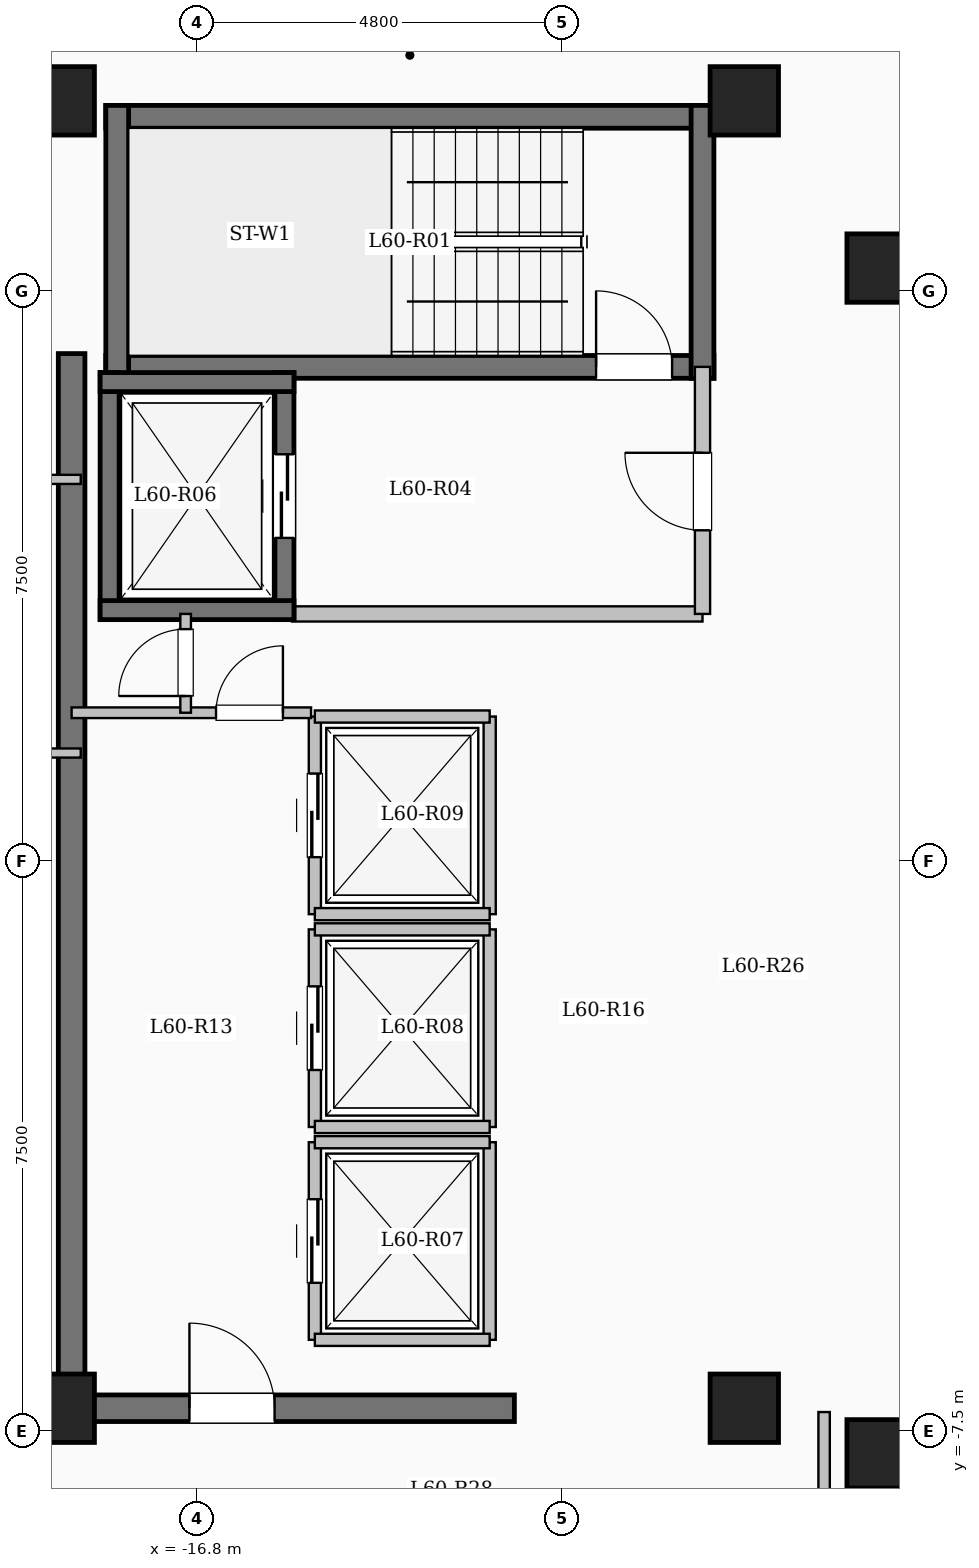
"""IFC4 building model, lengths in metres.
Left out: names, types, materials, properties, quantities, classifications, styles, units other than length and angle.
Written with IfcOpenShell. Run it as: python <this file> out.ifc"""

import sys

from ifc_helpers import new_model, si_unit, direction, frame, frame_2d, origin, origin_2d, place, context, subcontext, project, spatial, rectangle, extrude, element, fill, save


model = new_model("IFC4")
c1 = context("Model", 3, precision=1e-05, world=origin(), true_north=direction((0.0, 1.0)))
c2 = subcontext(c1, "Body", "Model", "MODEL_VIEW")
j1 = project(units=[si_unit("LENGTHUNIT", "METRE"), si_unit("PLANEANGLEUNIT", "RADIAN")], contexts=[c1])
p1 = place(None, origin())
s1 = spatial("IfcSite", under=j1, at=p1, CompositionType="ELEMENT")
p2 = place(p1, origin())
s2 = spatial("IfcBuilding", under=s1, at=p2, CompositionType="ELEMENT")
p3 = place(p2, frame((0.0, 0.0, 220.4)))
s3 = spatial("IfcBuildingStorey", under=s2, at=p3, CompositionType="ELEMENT", Elevation=220.4)
for number, where, z_axis, x_axis in (
    (1, (-7.8, -7.8, 0.0), (0.0, 0.0, 1.0), (1.0, 0.0, 0.0)),
    (2, (-7.8, 7.8, 0.0), (0.0, 0.0, 1.0), (1.0, 0.0, 0.0)),
    (3, (-9.6, -7.2, 0.0), (0.0, 0.0, 1.0), (1.0, 0.0, 0.0)),
    (4, (-9.6, 10.0, 0.0), (0.0, 0.0, 1.0), (1.0, 0.0, 0.0)),
    (5, (-18.6, -7.2, 0.0), (0.0, 0.0, 1.0), (1.0, 0.0, 0.0)),
    (6, (-18.6, 10.0, 0.0), (0.0, 0.0, 1.0), (1.0, 0.0, 0.0)),
):
    element("IfcColumn", number, at=place(p3, frame(where, z_axis=z_axis, x_axis=x_axis)), inside=s3, PredefinedType="COLUMN", context=c2, shape_type="SweptSolid", body=[
        extrude(rectangle(XDim=0.9, YDim=0.9, at=origin_2d()), origin(), (0.0, 0.0, 1.0), 3.35),
    ])
p4 = place(p3, frame((-18.0, 9.79, 0.0), z_axis=(0.0, 0.0, 1.0), x_axis=(1.0, 0.0, 0.0)))
e7 = element("IfcWall", 7, at=p4, inside=s3, PredefinedType="SHEAR", context=c2, shape_type="SweptSolid", body=[
    extrude(rectangle(XDim=8.0, YDim=0.3, at=frame_2d((4.0, 0.0))), origin(), (0.0, 0.0, 1.0), 3.35),
])
p5 = place(p3, frame((-18.0, 6.5, 0.0), z_axis=(0.0, 0.0, 1.0), x_axis=(1.0, 0.0, 0.0)))
e8 = element("IfcWall", 8, at=p5, inside=s3, PredefinedType="SHEAR", context=c2, shape_type="SweptSolid", body=[
    extrude(rectangle(XDim=8.0, YDim=0.3, at=frame_2d((4.0, 0.0))), origin(), (0.0, 0.0, 1.0), 3.35),
])
p6 = place(p5, frame((6.45, 0.0, 0.0)))
e9 = element("IfcOpeningElement", 9, at=p6, cuts=e8, PredefinedType="OPENING", context=c2, shape_type="SweptSolid", body=[
    extrude(rectangle(XDim=1.0, YDim=2.15, at=frame_2d((0.5, 1.075))), frame((0.0, 0.16, 0.0), z_axis=(0.0, -1.0, 0.0), x_axis=(1.0, 0.0, 0.0)), (0.0, 0.0, 1.0), 0.32),
])
for number, where, z_axis, x_axis in (
    (10, (-17.85, 6.35, 0.0), (0.0, 0.0, 1.0), (0.0, 1.0, 0.0)),
    (11, (-10.15, 6.35, 0.0), (0.0, 0.0, 1.0), (0.0, 1.0, 0.0)),
):
    element("IfcWall", number, at=place(p3, frame(where, z_axis=z_axis, x_axis=x_axis)), inside=s3, PredefinedType="SHEAR", context=c2, shape_type="SweptSolid", body=[
        extrude(rectangle(XDim=3.59, YDim=0.3, at=frame_2d((1.795, 0.0))), origin(), (0.0, 0.0, 1.0), 3.35),
    ])
p7 = place(p3, frame((-15.55, 3.25, 0.0), z_axis=(0.0, 0.0, 1.0), x_axis=(1.0, 0.0, 0.0)))
e12 = element("IfcWall", 12, at=p7, inside=s3, PredefinedType="SOLIDWALL", context=c2, shape_type="SweptSolid", body=[
    extrude(rectangle(XDim=5.4, YDim=0.2, at=frame_2d((2.7, 0.0))), origin(), (0.0, 0.0, 1.0), 3.1),
])
p8 = place(p3, frame((-10.15, 3.25, 0.0), z_axis=(0.0, 0.0, 1.0), x_axis=(0.0, 1.0, 0.0)))
e13 = element("IfcWall", 13, at=p8, inside=s3, PredefinedType="SOLIDWALL", context=c2, shape_type="SweptSolid", body=[
    extrude(rectangle(XDim=3.25, YDim=0.2, at=frame_2d((1.625, 0.0))), origin(), (0.0, 0.0, 1.0), 3.1),
])
p9 = place(p8, frame((1.1, 0.0, 0.0)))
e14 = element("IfcOpeningElement", 14, at=p9, cuts=e13, PredefinedType="OPENING", context=c2, shape_type="SweptSolid", body=[
    extrude(rectangle(XDim=1.02, YDim=2.15, at=frame_2d((0.51, 1.075))), frame((0.0, 0.11, 0.0), z_axis=(0.0, -1.0, 0.0), x_axis=(1.0, 0.0, 0.0)), (0.0, 0.0, 1.0), 0.22),
])
p10 = place(p3, frame((-17.95, 3.175, 0.0), z_axis=(0.0, 0.0, 1.0), x_axis=(0.0, 1.0, 0.0)))
e15 = element("IfcWall", 15, at=p10, inside=s3, PredefinedType="SHEAR", context=c2, shape_type="SweptSolid", body=[
    extrude(rectangle(XDim=3.25, YDim=0.25, at=frame_2d((1.625, 0.0))), origin(), (0.0, 0.0, 1.0), 3.35),
])
p11 = place(p3, frame((-15.65, 3.175, 0.0), z_axis=(0.0, 0.0, 1.0), x_axis=(0.0, 1.0, 0.0)))
e16 = element("IfcWall", 16, at=p11, inside=s3, PredefinedType="SHEAR", context=c2, shape_type="SweptSolid", body=[
    extrude(rectangle(XDim=3.25, YDim=0.25, at=frame_2d((1.625, 0.0))), origin(), (0.0, 0.0, 1.0), 3.35),
])
p12 = place(p11, frame((1.075, 0.0, 0.0)))
e17 = element("IfcOpeningElement", 17, at=p12, cuts=e16, PredefinedType="OPENING", context=c2, shape_type="SweptSolid", body=[
    extrude(rectangle(XDim=1.1, YDim=2.15, at=frame_2d((0.55, 1.075))), frame((0.0, 0.135, 0.0), z_axis=(0.0, -1.0, 0.0), x_axis=(1.0, 0.0, 0.0)), (0.0, 0.0, 1.0), 0.27),
])
for number, where, z_axis, x_axis in (
    (18, (-18.075, 3.3, 0.0), (0.0, 0.0, 1.0), (1.0, 0.0, 0.0)),
    (19, (-18.075, 6.3, 0.0), (0.0, 0.0, 1.0), (1.0, 0.0, 0.0)),
):
    element("IfcWall", number, at=place(p3, frame(where, z_axis=z_axis, x_axis=x_axis)), inside=s3, PredefinedType="SHEAR", context=c2, shape_type="SweptSolid", body=[
        extrude(rectangle(XDim=2.55, YDim=0.25, at=frame_2d((1.275, 0.0))), origin(), (0.0, 0.0, 1.0), 3.35),
    ])
p13 = place(p3, frame((-15.25, -6.3, 0.0), z_axis=(0.0, 0.0, 1.0), x_axis=(0.0, 1.0, 0.0)))
e20 = element("IfcWall", 20, at=p13, inside=s3, PredefinedType="SOLIDWALL", context=c2, shape_type="SweptSolid", body=[
    extrude(rectangle(XDim=2.6, YDim=0.16, at=frame_2d((1.3, 0.0))), origin(), (0.0, 0.0, 1.0), 3.1),
])
p14 = place(p13, frame((0.75, 0.0, 0.0)))
e21 = element("IfcOpeningElement", 21, at=p14, cuts=e20, PredefinedType="OPENING", context=c2, shape_type="SweptSolid", body=[
    extrude(rectangle(XDim=1.1, YDim=2.15, at=frame_2d((0.55, 1.075))), frame((0.0, 0.09, 0.0), z_axis=(0.0, -1.0, 0.0), x_axis=(1.0, 0.0, 0.0)), (0.0, 0.0, 1.0), 0.18),
])
p15 = place(p3, frame((-12.95, -6.3, 0.0), z_axis=(0.0, 0.0, 1.0), x_axis=(0.0, 1.0, 0.0)))
e22 = element("IfcWall", 22, at=p15, inside=s3, PredefinedType="SOLIDWALL", context=c2, shape_type="SweptSolid", body=[
    extrude(rectangle(XDim=2.6, YDim=0.16, at=frame_2d((1.3, 0.0))), origin(), (0.0, 0.0, 1.0), 3.1),
])
for number, where, z_axis, x_axis in (
    (23, (-15.25, -6.3, 0.0), (0.0, 0.0, 1.0), (1.0, 0.0, 0.0)),
    (24, (-15.25, -3.7, 0.0), (0.0, 0.0, 1.0), (1.0, 0.0, 0.0)),
):
    element("IfcWall", number, at=place(p3, frame(where, z_axis=z_axis, x_axis=x_axis)), inside=s3, PredefinedType="SOLIDWALL", context=c2, shape_type="SweptSolid", body=[
        extrude(rectangle(XDim=2.3, YDim=0.16, at=frame_2d((1.15, 0.0))), origin(), (0.0, 0.0, 1.0), 3.1),
    ])
p16 = place(p3, frame((-15.25, -3.5, 0.0), z_axis=(0.0, 0.0, 1.0), x_axis=(0.0, 1.0, 0.0)))
e25 = element("IfcWall", 25, at=p16, inside=s3, PredefinedType="SOLIDWALL", context=c2, shape_type="SweptSolid", body=[
    extrude(rectangle(XDim=2.6, YDim=0.16, at=frame_2d((1.3, 0.0))), origin(), (0.0, 0.0, 1.0), 3.1),
])
p17 = place(p16, frame((0.75, 0.0, 0.0)))
e26 = element("IfcOpeningElement", 26, at=p17, cuts=e25, PredefinedType="OPENING", context=c2, shape_type="SweptSolid", body=[
    extrude(rectangle(XDim=1.1, YDim=2.15, at=frame_2d((0.55, 1.075))), frame((0.0, 0.09, 0.0), z_axis=(0.0, -1.0, 0.0), x_axis=(1.0, 0.0, 0.0)), (0.0, 0.0, 1.0), 0.18),
])
p18 = place(p3, frame((-12.95, -3.5, 0.0), z_axis=(0.0, 0.0, 1.0), x_axis=(0.0, 1.0, 0.0)))
e27 = element("IfcWall", 27, at=p18, inside=s3, PredefinedType="SOLIDWALL", context=c2, shape_type="SweptSolid", body=[
    extrude(rectangle(XDim=2.6, YDim=0.16, at=frame_2d((1.3, 0.0))), origin(), (0.0, 0.0, 1.0), 3.1),
])
for number, where, z_axis, x_axis in (
    (28, (-15.25, -3.5, 0.0), (0.0, 0.0, 1.0), (1.0, 0.0, 0.0)),
    (29, (-15.25, -0.9, 0.0), (0.0, 0.0, 1.0), (1.0, 0.0, 0.0)),
):
    element("IfcWall", number, at=place(p3, frame(where, z_axis=z_axis, x_axis=x_axis)), inside=s3, PredefinedType="SOLIDWALL", context=c2, shape_type="SweptSolid", body=[
        extrude(rectangle(XDim=2.3, YDim=0.16, at=frame_2d((1.15, 0.0))), origin(), (0.0, 0.0, 1.0), 3.1),
    ])
p19 = place(p3, frame((-15.25, -0.7, 0.0), z_axis=(0.0, 0.0, 1.0), x_axis=(0.0, 1.0, 0.0)))
e30 = element("IfcWall", 30, at=p19, inside=s3, PredefinedType="SOLIDWALL", context=c2, shape_type="SweptSolid", body=[
    extrude(rectangle(XDim=2.6, YDim=0.16, at=frame_2d((1.3, 0.0))), origin(), (0.0, 0.0, 1.0), 3.1),
])
p20 = place(p19, frame((0.75, 0.0, 0.0)))
e31 = element("IfcOpeningElement", 31, at=p20, cuts=e30, PredefinedType="OPENING", context=c2, shape_type="SweptSolid", body=[
    extrude(rectangle(XDim=1.1, YDim=2.15, at=frame_2d((0.55, 1.075))), frame((0.0, 0.09, 0.0), z_axis=(0.0, -1.0, 0.0), x_axis=(1.0, 0.0, 0.0)), (0.0, 0.0, 1.0), 0.18),
])
p21 = place(p3, frame((-12.95, -0.7, 0.0), z_axis=(0.0, 0.0, 1.0), x_axis=(0.0, 1.0, 0.0)))
e32 = element("IfcWall", 32, at=p21, inside=s3, PredefinedType="SOLIDWALL", context=c2, shape_type="SweptSolid", body=[
    extrude(rectangle(XDim=2.6, YDim=0.16, at=frame_2d((1.3, 0.0))), origin(), (0.0, 0.0, 1.0), 3.1),
])
for number, where, z_axis, x_axis in (
    (33, (-15.25, -0.7, 0.0), (0.0, 0.0, 1.0), (1.0, 0.0, 0.0)),
    (34, (-15.25, 1.9, 0.0), (0.0, 0.0, 1.0), (1.0, 0.0, 0.0)),
):
    element("IfcWall", number, at=place(p3, frame(where, z_axis=z_axis, x_axis=x_axis)), inside=s3, PredefinedType="SOLIDWALL", context=c2, shape_type="SweptSolid", body=[
        extrude(rectangle(XDim=2.3, YDim=0.16, at=frame_2d((1.15, 0.0))), origin(), (0.0, 0.0, 1.0), 3.1),
    ])
p22 = place(p3, frame((-18.45, -7.375, 0.0), z_axis=(0.0, 0.0, 1.0), x_axis=(0.0, 1.0, 0.0)))
e35 = element("IfcWall", 35, at=p22, inside=s3, PredefinedType="SHEAR", context=c2, shape_type="SweptSolid", body=[
    extrude(rectangle(XDim=14.05, YDim=0.35, at=frame_2d((7.025, 0.0))), origin(), (0.0, 0.0, 1.0), 3.35),
])
p23 = place(p3, frame((-18.625, -7.2, 0.0), z_axis=(0.0, 0.0, 1.0), x_axis=(1.0, 0.0, 0.0)))
e36 = element("IfcWall", 36, at=p23, inside=s3, PredefinedType="SHEAR", context=c2, shape_type="SweptSolid", body=[
    extrude(rectangle(XDim=6.0, YDim=0.35, at=frame_2d((3.0, 0.0))), origin(), (0.0, 0.0, 1.0), 3.35),
])
p24 = place(p23, frame((1.725, 0.0, 0.0)))
e37 = element("IfcOpeningElement", 37, at=p24, cuts=e36, PredefinedType="OPENING", context=c2, shape_type="SweptSolid", body=[
    extrude(rectangle(XDim=1.12, YDim=2.15, at=frame_2d((0.56, 1.075))), frame((0.0, 0.185, 0.0), z_axis=(0.0, -1.0, 0.0), x_axis=(1.0, 0.0, 0.0)), (0.0, 0.0, 1.0), 0.37),
])
p25 = place(p3, frame((-18.45, 1.95, 0.0), z_axis=(0.0, 0.0, 1.0), x_axis=(1.0, 0.0, 0.0)))
e38 = element("IfcWall", 38, at=p25, inside=s3, PredefinedType="PARTITIONING", context=c2, shape_type="SweptSolid", body=[
    extrude(rectangle(XDim=3.15, YDim=0.14, at=frame_2d((1.575, 0.0))), origin(), (0.0, 0.0, 1.0), 3.1),
])
p26 = place(p25, frame((1.9, 0.0, 0.0)))
e39 = element("IfcOpeningElement", 39, at=p26, cuts=e38, PredefinedType="OPENING", context=c2, shape_type="SweptSolid", body=[
    extrude(rectangle(XDim=0.88, YDim=2.1, at=frame_2d((0.44, 1.05))), frame((0.0, 0.08, 0.0), z_axis=(0.0, -1.0, 0.0), x_axis=(1.0, 0.0, 0.0)), (0.0, 0.0, 1.0), 0.16),
])
p27 = place(p3, frame((-16.95, 1.95, 0.0), z_axis=(0.0, 0.0, 1.0), x_axis=(0.0, 1.0, 0.0)))
e40 = element("IfcWall", 40, at=p27, inside=s3, PredefinedType="PARTITIONING", context=c2, shape_type="SweptSolid", body=[
    extrude(rectangle(XDim=1.3, YDim=0.14, at=frame_2d((0.65, 0.0))), origin(), (0.0, 0.0, 1.0), 3.1),
])
p28 = place(p27, frame((0.22, 0.0, 0.0)))
e41 = element("IfcOpeningElement", 41, at=p28, cuts=e40, PredefinedType="OPENING", context=c2, shape_type="SweptSolid", body=[
    extrude(rectangle(XDim=0.88, YDim=2.1, at=frame_2d((0.44, 1.05))), frame((0.0, 0.08, 0.0), z_axis=(0.0, -1.0, 0.0), x_axis=(1.0, 0.0, 0.0)), (0.0, 0.0, 1.0), 0.16),
])
p29 = place(p3, frame((-8.55, -9.4, 0.0), z_axis=(0.0, 0.0, 1.0), x_axis=(0.0, 1.0, 0.0)))
e42 = element("IfcWall", 42, at=p29, inside=s3, PredefinedType="PARTITIONING", context=c2, shape_type="SweptSolid", body=[
    extrude(rectangle(XDim=2.15, YDim=0.15, at=frame_2d((1.075, 0.0))), origin(), (0.0, 0.0, 1.0), 3.1),
])
p30 = place(p3, frame((-23.58, -7.25, 0.0), z_axis=(0.0, 0.0, 1.0), x_axis=(1.0, 0.0, 0.0)))
e43 = element("IfcWall", 43, at=p30, inside=s3, PredefinedType="PARTITIONING", context=c2, shape_type="SweptSolid", body=[
    extrude(rectangle(XDim=5.13, YDim=0.15, at=frame_2d((2.565, 0.0))), origin(), (0.0, 0.0, 1.0), 3.1),
])
p31 = place(p30, frame((2.18, 0.0, 0.0)))
e44 = element("IfcOpeningElement", 44, at=p31, cuts=e43, PredefinedType="OPENING", context=c2, shape_type="SweptSolid", body=[
    extrude(rectangle(XDim=0.96, YDim=2.15, at=frame_2d((0.48, 1.075))), frame((0.0, 0.085, 0.0), z_axis=(0.0, -1.0, 0.0), x_axis=(1.0, 0.0, 0.0)), (0.0, 0.0, 1.0), 0.17),
])
p32 = place(p3, frame((-23.7, 1.42, 0.0), z_axis=(0.0, 0.0, 1.0), x_axis=(1.0, 0.0, 0.0)))
e45 = element("IfcWall", 45, at=p32, inside=s3, PredefinedType="PARTITIONING", context=c2, shape_type="SweptSolid", body=[
    extrude(rectangle(XDim=5.37, YDim=0.12, at=frame_2d((2.685, 0.0))), origin(), (0.0, 0.0, 1.0), 3.1),
])
p33 = place(p32, frame((0.937, 0.0, 0.0)))
e46 = element("IfcOpeningElement", 46, at=p33, cuts=e45, PredefinedType="OPENING", context=c2, shape_type="SweptSolid", body=[
    extrude(rectangle(XDim=0.88, YDim=2.1, at=frame_2d((0.44, 1.05))), frame((0.0, 0.07, 0.0), z_axis=(0.0, -1.0, 0.0), x_axis=(1.0, 0.0, 0.0)), (0.0, 0.0, 1.0), 0.14),
])
p34 = place(p32, frame((3.452, 0.0, 0.0)))
e47 = element("IfcOpeningElement", 47, at=p34, cuts=e45, PredefinedType="OPENING", context=c2, shape_type="SweptSolid", body=[
    extrude(rectangle(XDim=0.88, YDim=2.1, at=frame_2d((0.44, 1.05))), frame((0.0, 0.07, 0.0), z_axis=(0.0, -1.0, 0.0), x_axis=(1.0, 0.0, 0.0)), (0.0, 0.0, 1.0), 0.14),
])
p35 = place(p3, frame((-23.7, 5.02, 0.0), z_axis=(0.0, 0.0, 1.0), x_axis=(1.0, 0.0, 0.0)))
e48 = element("IfcWall", 48, at=p35, inside=s3, PredefinedType="PARTITIONING", context=c2, shape_type="SweptSolid", body=[
    extrude(rectangle(XDim=5.37, YDim=0.12, at=frame_2d((2.685, 0.0))), origin(), (0.0, 0.0, 1.0), 3.1),
])
p36 = place(p35, frame((3.8, 0.0, 0.0)))
e49 = element("IfcOpeningElement", 49, at=p36, cuts=e48, PredefinedType="OPENING", context=c2, shape_type="SweptSolid", body=[
    extrude(rectangle(XDim=0.88, YDim=2.1, at=frame_2d((0.44, 1.05))), frame((0.0, 0.07, 0.0), z_axis=(0.0, -1.0, 0.0), x_axis=(1.0, 0.0, 0.0)), (0.0, 0.0, 1.0), 0.14),
])
p37 = place(p6, origin())
e50 = element("IfcDoor", 50, at=p37, inside=s3, OperationType="SINGLE_SWING_LEFT", PredefinedType="DOOR", context=c2, shape_type="SweptSolid", body=[
    extrude(rectangle(XDim=1.0, YDim=2.15, at=frame_2d((0.5, 1.075))), frame((0.0, 0.025, 0.0), z_axis=(0.0, -1.0, 0.0), x_axis=(1.0, 0.0, 0.0)), (0.0, 0.0, 1.0), 0.05),
])
fill(e9, e50)
p38 = place(p9, origin())
e51 = element("IfcDoor", 51, at=p38, inside=s3, OperationType="SINGLE_SWING_RIGHT", PredefinedType="DOOR", context=c2, shape_type="SweptSolid", body=[
    extrude(rectangle(XDim=1.02, YDim=2.15, at=frame_2d((0.51, 1.075))), frame((0.0, 0.025, 0.0), z_axis=(0.0, -1.0, 0.0), x_axis=(1.0, 0.0, 0.0)), (0.0, 0.0, 1.0), 0.05),
])
fill(e14, e51)
p39 = place(p12, origin())
e52 = element("IfcDoor", 52, at=p39, inside=s3, OperationType="SLIDING_TO_LEFT", PredefinedType="DOOR", context=c2, shape_type="SweptSolid", body=[
    extrude(rectangle(XDim=1.1, YDim=2.15, at=frame_2d((0.55, 1.075))), frame((0.0, 0.025, 0.0), z_axis=(0.0, -1.0, 0.0), x_axis=(1.0, 0.0, 0.0)), (0.0, 0.0, 1.0), 0.05),
])
fill(e17, e52)
p40 = place(p14, origin())
e53 = element("IfcDoor", 53, at=p40, inside=s3, OperationType="SLIDING_TO_LEFT", PredefinedType="DOOR", context=c2, shape_type="SweptSolid", body=[
    extrude(rectangle(XDim=1.1, YDim=2.15, at=frame_2d((0.55, 1.075))), frame((0.0, 0.025, 0.0), z_axis=(0.0, -1.0, 0.0), x_axis=(1.0, 0.0, 0.0)), (0.0, 0.0, 1.0), 0.05),
])
fill(e21, e53)
p41 = place(p17, origin())
e54 = element("IfcDoor", 54, at=p41, inside=s3, OperationType="SLIDING_TO_LEFT", PredefinedType="DOOR", context=c2, shape_type="SweptSolid", body=[
    extrude(rectangle(XDim=1.1, YDim=2.15, at=frame_2d((0.55, 1.075))), frame((0.0, 0.025, 0.0), z_axis=(0.0, -1.0, 0.0), x_axis=(1.0, 0.0, 0.0)), (0.0, 0.0, 1.0), 0.05),
])
fill(e26, e54)
p42 = place(p20, origin())
e55 = element("IfcDoor", 55, at=p42, inside=s3, OperationType="SLIDING_TO_LEFT", PredefinedType="DOOR", context=c2, shape_type="SweptSolid", body=[
    extrude(rectangle(XDim=1.1, YDim=2.15, at=frame_2d((0.55, 1.075))), frame((0.0, 0.025, 0.0), z_axis=(0.0, -1.0, 0.0), x_axis=(1.0, 0.0, 0.0)), (0.0, 0.0, 1.0), 0.05),
])
fill(e31, e55)
p43 = place(p24, origin())
e56 = element("IfcDoor", 56, at=p43, inside=s3, OperationType="SINGLE_SWING_LEFT", PredefinedType="DOOR", context=c2, shape_type="SweptSolid", body=[
    extrude(rectangle(XDim=1.12, YDim=2.15, at=frame_2d((0.56, 1.075))), frame((0.0, 0.025, 0.0), z_axis=(0.0, -1.0, 0.0), x_axis=(1.0, 0.0, 0.0)), (0.0, 0.0, 1.0), 0.05),
])
fill(e37, e56)
p44 = place(p26, origin())
e57 = element("IfcDoor", 57, at=p44, inside=s3, OperationType="SINGLE_SWING_RIGHT", PredefinedType="DOOR", context=c2, shape_type="SweptSolid", body=[
    extrude(rectangle(XDim=0.88, YDim=2.1, at=frame_2d((0.44, 1.05))), frame((0.0, 0.025, 0.0), z_axis=(0.0, -1.0, 0.0), x_axis=(1.0, 0.0, 0.0)), (0.0, 0.0, 1.0), 0.05),
])
fill(e39, e57)
p45 = place(p28, origin())
e58 = element("IfcDoor", 58, at=p45, inside=s3, OperationType="SINGLE_SWING_LEFT", PredefinedType="DOOR", context=c2, shape_type="SweptSolid", body=[
    extrude(rectangle(XDim=0.88, YDim=2.1, at=frame_2d((0.44, 1.05))), frame((0.0, 0.025, 0.0), z_axis=(0.0, -1.0, 0.0), x_axis=(1.0, 0.0, 0.0)), (0.0, 0.0, 1.0), 0.05),
])
fill(e41, e58)
save(model, sys.argv[1])
